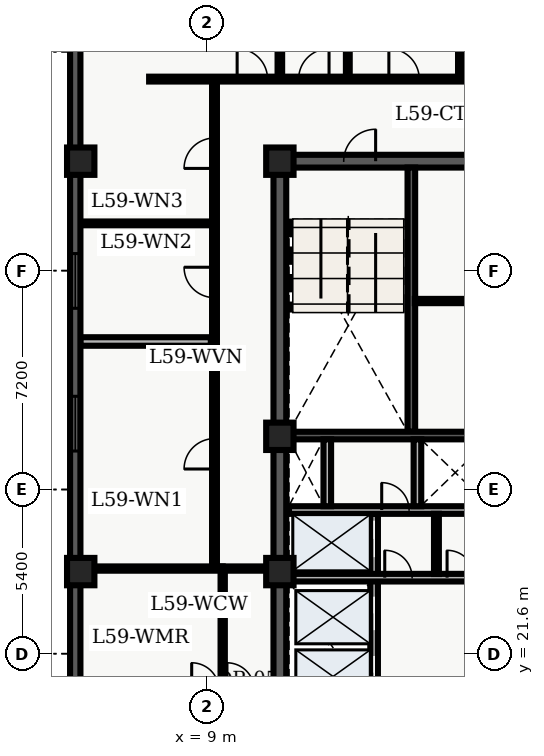
"""IFC4 building model, lengths in metres.
Left out: names, types, materials, properties, quantities, classifications, styles, units other than length and angle.
Written with IfcOpenShell. Run it as: python <this file> out.ifc"""

import sys

from ifc_helpers import new_model, entity, si_unit, converted_unit, direction, frame, origin_with_axes, origin_2d_with_axis, place, context, subcontext, project, spatial, polyline, rectangle, outline, extrude, element, fill, save


model = new_model("IFC4")
c1 = context("Model", 3, precision=1e-05, world=origin_with_axes(), true_north=direction((0.0, 1.0)))
c2 = subcontext(c1, "Body", "Model", "MODEL_VIEW")
j1 = project(units=[si_unit("LENGTHUNIT", "METRE"), converted_unit("PLANEANGLEUNIT", "DEGREE", entity("IfcPlaneAngleMeasure", 0.017), si_unit("PLANEANGLEUNIT", "RADIAN"), dimensions=[0, 0, 0, 0, 0, 0, 0])], contexts=[c1])
p1 = place(None, origin_with_axes())
s1 = spatial("IfcSite", under=j1, at=p1, CompositionType="ELEMENT")
p2 = place(p1, origin_with_axes())
s2 = spatial("IfcBuilding", under=s1, at=p2, CompositionType="ELEMENT")
p3 = place(p2, frame((0.0, 0.0, 240.3), z_axis=(0.0, 0.0, 1.0), x_axis=(1.0, 0.0, 0.0)))
s3 = spatial("IfcBuildingStorey", under=s2, at=p3, CompositionType="ELEMENT", Elevation=240.3)
p4 = place(p3, frame((11.4, 10.8, 0.0), z_axis=(0.0, 0.0, 1.0), x_axis=(0.0, 1.0, 0.0)))
e1 = element("IfcWall", 1, at=p4, inside=s3, PredefinedType="SHEAR", context=c2, shape_type="SweptSolid", body=[
    extrude(outline(polyline([(0.0, -0.21), (27.0, -0.21), (27.0, 0.21), (0.0, 0.21), (0.0, -0.21)])), origin_with_axes(), (0.0, 0.0, 1.0), 3.66),
])
p5 = place(p3, frame((11.4, 37.8, 0.0), z_axis=(0.0, 0.0, 1.0), x_axis=(1.0, 0.0, 0.0)))
e2 = element("IfcWall", 2, at=p5, inside=s3, PredefinedType="SHEAR", context=c2, shape_type="SweptSolid", body=[
    extrude(outline(polyline([(0.0, -0.21), (7.2, -0.21), (7.2, 0.21), (0.0, 0.21), (0.0, -0.21)])), origin_with_axes(), (0.0, 0.0, 1.0), 3.66),
])
p6 = place(p5, frame((2.625, 0.0, 0.0), z_axis=(0.0, 0.0, 1.0), x_axis=(1.0, 0.0, 0.0)))
e3 = element("IfcOpeningElement", 3, at=p6, cuts=e2, PredefinedType="OPENING", context=c2, shape_type="SweptSolid", body=[
    extrude(rectangle(XDim=1.05, YDim=0.44, at=origin_2d_with_axis()), origin_with_axes(), (0.0, 0.0, 1.0), 2.15),
])
p7 = place(p3, frame((15.725, 28.9, 0.0), z_axis=(0.0, 0.0, 1.0), x_axis=(0.0, 1.0, 0.0)))
e4 = element("IfcWall", 4, at=p7, inside=s3, PredefinedType="SHEAR", context=c2, shape_type="SweptSolid", body=[
    extrude(outline(polyline([(0.0, -0.125), (8.69, -0.125), (8.69, 0.125), (0.0, 0.125), (0.0, -0.125)])), origin_with_axes(), (0.0, 0.0, 1.0), 3.66),
])
p8 = place(p3, frame((11.61, 28.775, 0.0), z_axis=(0.0, 0.0, 1.0), x_axis=(1.0, 0.0, 0.0)))
e5 = element("IfcWall", 5, at=p8, inside=s3, PredefinedType="SHEAR", context=c2, shape_type="SweptSolid", body=[
    extrude(outline(polyline([(0.0, -0.125), (6.78, -0.125), (6.78, 0.125), (0.0, 0.125), (0.0, -0.125)])), origin_with_axes(), (0.0, 0.0, 1.0), 3.66),
])
p9 = place(p3, frame((14.5, 19.95, 0.0), z_axis=(0.0, 0.0, 1.0), x_axis=(0.0, 1.0, 0.0)))
e6 = element("IfcWall", 6, at=p9, inside=s3, PredefinedType="SOLIDWALL", context=c2, shape_type="SweptSolid", body=[
    extrude(outline(polyline([(0.0, -0.125), (6.25, -0.125), (6.25, 0.125), (0.0, 0.125), (0.0, -0.125)])), origin_with_axes(), (0.0, 0.0, 1.0), 2.7),
])
p10 = place(p9, frame((1.025, 0.0, 0.0), z_axis=(0.0, 0.0, 1.0), x_axis=(1.0, 0.0, 0.0)))
e7 = element("IfcOpeningElement", 7, at=p10, cuts=e6, PredefinedType="OPENING", context=c2, shape_type="SweptSolid", body=[
    extrude(rectangle(XDim=1.1, YDim=0.27, at=origin_2d_with_axis()), origin_with_axes(), (0.0, 0.0, 1.0), 2.15),
])
p11 = place(p9, frame((2.975, 0.0, 0.0), z_axis=(0.0, 0.0, 1.0), x_axis=(1.0, 0.0, 0.0)))
e8 = element("IfcOpeningElement", 8, at=p11, cuts=e6, PredefinedType="OPENING", context=c2, shape_type="SweptSolid", body=[
    extrude(rectangle(XDim=1.1, YDim=0.27, at=origin_2d_with_axis()), origin_with_axes(), (0.0, 0.0, 1.0), 2.15),
])
p12 = place(p9, frame((5.425, 0.0, 0.0), z_axis=(0.0, 0.0, 1.0), x_axis=(1.0, 0.0, 0.0)))
e9 = element("IfcOpeningElement", 9, at=p12, cuts=e6, PredefinedType="OPENING", context=c2, shape_type="SweptSolid", body=[
    extrude(rectangle(XDim=1.2, YDim=0.27, at=origin_2d_with_axis()), origin_with_axes(), (0.0, 0.0, 1.0), 2.15),
])
p13 = place(p3, frame((11.7, 24.1, 0.0), z_axis=(0.0, 0.0, 1.0), x_axis=(1.0, 0.0, 0.0)))
e10 = element("IfcWall", 10, at=p13, inside=s3, PredefinedType="SOLIDWALL", context=c2, shape_type="SweptSolid", body=[
    extrude(outline(polyline([(0.0, -0.125), (6.6, -0.125), (6.6, 0.125), (0.0, 0.125), (0.0, -0.125)])), origin_with_axes(), (0.0, 0.0, 1.0), 2.7),
])
p14 = place(p13, frame((3.6, 0.0, 0.0), z_axis=(0.0, 0.0, 1.0), x_axis=(1.0, 0.0, 0.0)))
e11 = element("IfcOpeningElement", 11, at=p14, cuts=e10, PredefinedType="OPENING", context=c2, shape_type="SweptSolid", body=[
    extrude(rectangle(XDim=0.9, YDim=0.27, at=origin_2d_with_axis()), origin_with_axes(), (0.0, 0.0, 1.0), 2.15),
])
p15 = place(p13, frame((5.65, 0.0, 0.0), z_axis=(0.0, 0.0, 1.0), x_axis=(1.0, 0.0, 0.0)))
e12 = element("IfcOpeningElement", 12, at=p15, cuts=e10, PredefinedType="OPENING", context=c2, shape_type="SweptSolid", body=[
    extrude(rectangle(XDim=0.9, YDim=0.27, at=origin_2d_with_axis()), origin_with_axes(), (0.0, 0.0, 1.0), 2.15),
])
p16 = place(p3, frame((11.7, 26.325, 0.0), z_axis=(0.0, 0.0, 1.0), x_axis=(1.0, 0.0, 0.0)))
e13 = element("IfcWall", 13, at=p16, inside=s3, PredefinedType="SOLIDWALL", context=c2, shape_type="SweptSolid", body=[
    extrude(outline(polyline([(0.0, -0.125), (6.6, -0.125), (6.6, 0.125), (0.0, 0.125), (0.0, -0.125)])), origin_with_axes(), (0.0, 0.0, 1.0), 2.7),
])
p17 = place(p16, frame((3.5, 0.0, 0.0), z_axis=(0.0, 0.0, 1.0), x_axis=(1.0, 0.0, 0.0)))
e14 = element("IfcOpeningElement", 14, at=p17, cuts=e13, PredefinedType="OPENING", context=c2, shape_type="SweptSolid", body=[
    extrude(rectangle(XDim=0.9, YDim=0.27, at=origin_2d_with_axis()), origin_with_axes(), (0.0, 0.0, 1.0), 2.15),
])
for number, where, z_axis, x_axis in (
    (15, (12.96, 26.45, 0.0), (0.0, 0.0, 1.0), (0.0, 1.0, 0.0)),
    (16, (15.925, 26.45, 0.0), (0.0, 0.0, 1.0), (0.0, 1.0, 0.0)),
):
    element("IfcWall", number, at=place(p3, frame(where, z_axis=z_axis, x_axis=x_axis)), inside=s3, PredefinedType="SOLIDWALL", context=c2, shape_type="SweptSolid", body=[
        extrude(outline(polyline([(0.0, -0.125), (2.2, -0.125), (2.2, 0.125), (0.0, 0.125), (0.0, -0.125)])), origin_with_axes(), (0.0, 0.0, 1.0), 2.7),
    ])
for number, where, z_axis, x_axis in (
    (17, (11.4, 24.3, 0.0), (0.0, 0.0, 1.0), (1.0, 0.0, 0.0)),
    (18, (11.4, 28.75, 0.0), (0.0, 0.0, 1.0), (1.0, 0.0, 0.0)),
    (19, (11.4, 37.8, 0.0), (0.0, 0.0, 1.0), (1.0, 0.0, 0.0)),
    (20, (4.85, 24.3, 0.0), (0.0, 0.0, 1.0), (1.0, 0.0, 0.0)),
    (21, (4.85, 37.8, 0.0), (0.0, 0.0, 1.0), (1.0, 0.0, 0.0)),
):
    element("IfcColumn", number, at=place(p3, frame(where, z_axis=z_axis, x_axis=x_axis)), inside=s3, PredefinedType="COLUMN", context=c2, shape_type="SweptSolid", body=[
        extrude(rectangle(XDim=0.9, YDim=0.9, at=origin_2d_with_axis()), origin_with_axes(), (0.0, 0.0, 1.0), 3.9),
    ])
p18 = place(p3, frame((16.55, 24.22, 0.0), z_axis=(0.0, 0.0, 1.0), x_axis=(0.0, 1.0, 0.0)))
e22 = element("IfcWall", 22, at=p18, inside=s3, PredefinedType="PARTITIONING", context=c2, shape_type="SweptSolid", body=[
    extrude(outline(polyline([(0.0, -0.08), (1.98, -0.08), (1.98, 0.08), (0.0, 0.08), (0.0, -0.08)])), origin_with_axes(), (0.0, 0.0, 1.0), 2.7),
])
p19 = place(p3, frame((15.84, 33.2, 0.0), z_axis=(0.0, 0.0, 1.0), x_axis=(1.0, 0.0, 0.0)))
e23 = element("IfcWall", 23, at=p19, inside=s3, PredefinedType="PARTITIONING", context=c2, shape_type="SweptSolid", body=[
    extrude(outline(polyline([(0.0, -0.07), (2.46, -0.07), (2.46, 0.07), (0.0, 0.07), (0.0, -0.07)])), origin_with_axes(), (0.0, 0.0, 1.0), 2.7),
])
p20 = place(p3, frame((9.52, 20.4, 0.0), z_axis=(0.0, 0.0, 1.0), x_axis=(0.0, 1.0, 0.0)))
e24 = element("IfcWall", 24, at=p20, inside=s3, PredefinedType="PARTITIONING", context=c2, shape_type="SweptSolid", body=[
    extrude(outline(polyline([(0.0, -0.07), (4.0, -0.07), (4.0, 0.07), (0.0, 0.07), (0.0, -0.07)])), origin_with_axes(), (0.0, 0.0, 1.0), 2.7),
])
p21 = place(p3, frame((9.52, 24.4, 0.0), z_axis=(0.0, 0.0, 1.0), x_axis=(1.0, 0.0, 0.0)))
e25 = element("IfcWall", 25, at=p21, inside=s3, PredefinedType="PARTITIONING", context=c2, shape_type="SweptSolid", body=[
    extrude(outline(polyline([(0.0, -0.07), (1.58, -0.07), (1.58, 0.07), (0.0, 0.07), (0.0, -0.07)])), origin_with_axes(), (0.0, 0.0, 1.0), 2.7),
])
p22 = place(p3, frame((7.1, 40.5, 0.0), z_axis=(0.0, 0.0, 1.0), x_axis=(1.0, 0.0, 0.0)))
e26 = element("IfcWall", 26, at=p22, inside=s3, PredefinedType="PARTITIONING", context=c2, shape_type="SweptSolid", body=[
    extrude(outline(polyline([(0.0, -0.08), (24.965, -0.08), (24.965, 0.08), (0.0, 0.08), (0.0, -0.08)])), origin_with_axes(), (0.0, 0.0, 1.0), 2.7),
])
p23 = place(p22, frame((3.395, 0.0, 0.0), z_axis=(0.0, 0.0, 1.0), x_axis=(1.0, 0.0, 0.0)))
e27 = element("IfcOpeningElement", 27, at=p23, cuts=e26, PredefinedType="OPENING", context=c2, shape_type="SweptSolid", body=[
    extrude(rectangle(XDim=1.0, YDim=0.18, at=origin_2d_with_axis()), origin_with_axes(), (0.0, 0.0, 1.0), 2.15),
])
p24 = place(p22, frame((5.418, 0.0, 0.0), z_axis=(0.0, 0.0, 1.0), x_axis=(1.0, 0.0, 0.0)))
e28 = element("IfcOpeningElement", 28, at=p24, cuts=e26, PredefinedType="OPENING", context=c2, shape_type="SweptSolid", body=[
    extrude(rectangle(XDim=1.0, YDim=0.18, at=origin_2d_with_axis()), origin_with_axes(), (0.0, 0.0, 1.0), 2.15),
])
p25 = place(p22, frame((8.386, 0.0, 0.0), z_axis=(0.0, 0.0, 1.0), x_axis=(1.0, 0.0, 0.0)))
e29 = element("IfcOpeningElement", 29, at=p25, cuts=e26, PredefinedType="OPENING", context=c2, shape_type="SweptSolid", body=[
    extrude(rectangle(XDim=1.0, YDim=0.18, at=origin_2d_with_axis()), origin_with_axes(), (0.0, 0.0, 1.0), 2.15),
])
p26 = place(p22, frame((11.068, 0.0, 0.0), z_axis=(0.0, 0.0, 1.0), x_axis=(1.0, 0.0, 0.0)))
e30 = element("IfcOpeningElement", 30, at=p26, cuts=e26, PredefinedType="OPENING", context=c2, shape_type="SweptSolid", body=[
    extrude(rectangle(XDim=1.0, YDim=0.18, at=origin_2d_with_axis()), origin_with_axes(), (0.0, 0.0, 1.0), 2.15),
])
p27 = place(p3, frame((9.25, 24.4, 0.0), z_axis=(0.0, 0.0, 1.0), x_axis=(0.0, 1.0, 0.0)))
e31 = element("IfcWall", 31, at=p27, inside=s3, PredefinedType="PARTITIONING", context=c2, shape_type="SweptSolid", body=[
    extrude(outline(polyline([(0.0, -0.08), (16.1, -0.08), (16.1, 0.08), (0.0, 0.08), (0.0, -0.08)])), origin_with_axes(), (0.0, 0.0, 1.0), 2.7),
])
p28 = place(p27, frame((3.775, 0.0, 0.0), z_axis=(0.0, 0.0, 1.0), x_axis=(1.0, 0.0, 0.0)))
e32 = element("IfcOpeningElement", 32, at=p28, cuts=e31, PredefinedType="OPENING", context=c2, shape_type="SweptSolid", body=[
    extrude(rectangle(XDim=1.0, YDim=0.18, at=origin_2d_with_axis()), origin_with_axes(), (0.0, 0.0, 1.0), 2.15),
])
p29 = place(p27, frame((9.412, 0.0, 0.0), z_axis=(0.0, 0.0, 1.0), x_axis=(1.0, 0.0, 0.0)))
e33 = element("IfcOpeningElement", 33, at=p29, cuts=e31, PredefinedType="OPENING", context=c2, shape_type="SweptSolid", body=[
    extrude(rectangle(XDim=1.0, YDim=0.18, at=origin_2d_with_axis()), origin_with_axes(), (0.0, 0.0, 1.0), 2.15),
])
p30 = place(p27, frame((13.662, 0.0, 0.0), z_axis=(0.0, 0.0, 1.0), x_axis=(1.0, 0.0, 0.0)))
e34 = element("IfcOpeningElement", 34, at=p30, cuts=e31, PredefinedType="OPENING", context=c2, shape_type="SweptSolid", body=[
    extrude(rectangle(XDim=1.0, YDim=0.18, at=origin_2d_with_axis()), origin_with_axes(), (0.0, 0.0, 1.0), 2.15),
])
p31 = place(p3, frame((4.835, 24.4, 0.0), z_axis=(0.0, 0.0, 1.0), x_axis=(1.0, 0.0, 0.0)))
e35 = element("IfcWall", 35, at=p31, inside=s3, PredefinedType="PARTITIONING", context=c2, shape_type="SweptSolid", body=[
    extrude(outline(polyline([(0.0, -0.07), (4.685, -0.07), (4.685, 0.07), (0.0, 0.07), (0.0, -0.07)])), origin_with_axes(), (0.0, 0.0, 1.0), 2.7),
])
p32 = place(p3, frame((4.835, 31.869, 0.0), z_axis=(0.0, 0.0, 1.0), x_axis=(1.0, 0.0, 0.0)))
e36 = element("IfcWall", 36, at=p32, inside=s3, PredefinedType="PARTITIONING", context=c2, shape_type="SweptSolid", body=[
    extrude(outline(polyline([(0.0, -0.14), (4.295, -0.14), (4.295, 0.14), (0.0, 0.14), (0.0, -0.14)])), origin_with_axes(), (0.0, 0.0, 1.0), 2.7),
])
p33 = place(p3, frame((4.835, 35.754, 0.0), z_axis=(0.0, 0.0, 1.0), x_axis=(1.0, 0.0, 0.0)))
e37 = element("IfcWall", 37, at=p33, inside=s3, PredefinedType="PARTITIONING", context=c2, shape_type="SweptSolid", body=[
    extrude(outline(polyline([(0.0, -0.062), (4.295, -0.062), (4.295, 0.062), (0.0, 0.062), (0.0, -0.062)])), origin_with_axes(), (0.0, 0.0, 1.0), 2.7),
])
p34 = place(p3, frame((11.4, 40.6, 0.0), z_axis=(0.0, 0.0, 1.0), x_axis=(0.0, 1.0, 0.0)))
e38 = element("IfcWall", 38, at=p34, inside=s3, PredefinedType="PARTITIONING", context=c2, shape_type="SweptSolid", body=[
    extrude(outline(polyline([(0.0, -0.075), (7.665, -0.075), (7.665, 0.075), (0.0, 0.075), (0.0, -0.075)])), origin_with_axes(), (0.0, 0.0, 1.0), 2.7),
])
p35 = place(p3, frame((13.635, 40.6, 0.0), z_axis=(0.0, 0.0, 1.0), x_axis=(0.0, 1.0, 0.0)))
e39 = element("IfcWall", 39, at=p35, inside=s3, PredefinedType="PARTITIONING", context=c2, shape_type="SweptSolid", body=[
    extrude(outline(polyline([(0.0, -0.062), (7.665, -0.062), (7.665, 0.062), (0.0, 0.062), (0.0, -0.062)])), origin_with_axes(), (0.0, 0.0, 1.0), 2.7),
])
p36 = place(p3, frame((17.336, 40.6, 0.0), z_axis=(0.0, 0.0, 1.0), x_axis=(0.0, 1.0, 0.0)))
e40 = element("IfcWall", 40, at=p36, inside=s3, PredefinedType="PARTITIONING", context=c2, shape_type="SweptSolid", body=[
    extrude(outline(polyline([(0.0, -0.075), (7.665, -0.075), (7.665, 0.075), (0.0, 0.075), (0.0, -0.075)])), origin_with_axes(), (0.0, 0.0, 1.0), 2.7),
])
p37 = place(p3, frame((4.67, 2.74, 0.0), z_axis=(0.0, 0.0, 1.0), x_axis=(0.0, 1.0, 0.0)))
e41 = element("IfcWall", 41, at=p37, inside=s3, PredefinedType="SOLIDWALL", context=c2, shape_type="SweptSolid", body=[
    extrude(outline(polyline([(0.0, -0.17), (43.46, -0.17), (43.46, 0.17), (0.0, 0.17), (0.0, -0.17)])), origin_with_axes(), (0.0, 0.0, 1.0), 3.66),
])
p38 = place(p37, frame((2.948, 0.0, 0.45), z_axis=(0.0, 0.0, 1.0), x_axis=(1.0, 0.0, 0.0)))
e42 = element("IfcOpeningElement", 42, at=p38, cuts=e41, PredefinedType="OPENING", context=c2, shape_type="SweptSolid", body=[
    extrude(rectangle(XDim=1.8, YDim=0.36, at=origin_2d_with_axis()), origin_with_axes(), (0.0, 0.0, 1.0), 2.1),
])
p39 = place(p37, frame((12.339, 0.0, 0.45), z_axis=(0.0, 0.0, 1.0), x_axis=(1.0, 0.0, 0.0)))
e43 = element("IfcOpeningElement", 43, at=p39, cuts=e41, PredefinedType="OPENING", context=c2, shape_type="SweptSolid", body=[
    extrude(rectangle(XDim=1.8, YDim=0.36, at=origin_2d_with_axis()), origin_with_axes(), (0.0, 0.0, 1.0), 2.1),
])
p40 = place(p37, frame((16.184, 0.0, 0.45), z_axis=(0.0, 0.0, 1.0), x_axis=(1.0, 0.0, 0.0)))
e44 = element("IfcOpeningElement", 44, at=p40, cuts=e41, PredefinedType="OPENING", context=c2, shape_type="SweptSolid", body=[
    extrude(rectangle(XDim=1.8, YDim=0.36, at=origin_2d_with_axis()), origin_with_axes(), (0.0, 0.0, 1.0), 2.1),
])
p41 = place(p37, frame((26.426, 0.0, 0.45), z_axis=(0.0, 0.0, 1.0), x_axis=(1.0, 0.0, 0.0)))
e45 = element("IfcOpeningElement", 45, at=p41, cuts=e41, PredefinedType="OPENING", context=c2, shape_type="SweptSolid", body=[
    extrude(rectangle(XDim=1.8, YDim=0.36, at=origin_2d_with_axis()), origin_with_axes(), (0.0, 0.0, 1.0), 2.1),
])
p42 = place(p37, frame((31.121, 0.0, 0.45), z_axis=(0.0, 0.0, 1.0), x_axis=(1.0, 0.0, 0.0)))
e46 = element("IfcOpeningElement", 46, at=p42, cuts=e41, PredefinedType="OPENING", context=c2, shape_type="SweptSolid", body=[
    extrude(rectangle(XDim=1.8, YDim=0.36, at=origin_2d_with_axis()), origin_with_axes(), (0.0, 0.0, 1.0), 2.1),
])
p43 = place(p37, frame((40.062, 0.0, 0.45), z_axis=(0.0, 0.0, 1.0), x_axis=(1.0, 0.0, 0.0)))
e47 = element("IfcOpeningElement", 47, at=p43, cuts=e41, PredefinedType="OPENING", context=c2, shape_type="SweptSolid", body=[
    extrude(rectangle(XDim=1.8, YDim=0.36, at=origin_2d_with_axis()), origin_with_axes(), (0.0, 0.0, 1.0), 2.1),
])
p44 = place(p9, frame((1.025, 0.0, 0.0), z_axis=(0.0, 0.0, 1.0), x_axis=(1.0, 0.0, 0.0)))
e48 = element("IfcDoor", 48, at=p44, inside=s3, OperationType="SLIDING_TO_LEFT", PredefinedType="DOOR", context=c2, shape_type="SweptSolid", body=[
    extrude(rectangle(XDim=1.1, YDim=0.09, at=origin_2d_with_axis()), origin_with_axes(), (0.0, 0.0, 1.0), 2.15),
])
fill(e7, e48)
p45 = place(p9, frame((2.975, 0.0, 0.0), z_axis=(0.0, 0.0, 1.0), x_axis=(1.0, 0.0, 0.0)))
e49 = element("IfcDoor", 49, at=p45, inside=s3, OperationType="SLIDING_TO_RIGHT", PredefinedType="DOOR", context=c2, shape_type="SweptSolid", body=[
    extrude(rectangle(XDim=1.1, YDim=0.09, at=origin_2d_with_axis()), origin_with_axes(), (0.0, 0.0, 1.0), 2.15),
])
fill(e8, e49)
p46 = place(p9, frame((5.425, 0.0, 0.0), z_axis=(0.0, 0.0, 1.0), x_axis=(1.0, 0.0, 0.0)))
e50 = element("IfcDoor", 50, at=p46, inside=s3, OperationType="DOUBLE_DOOR_SLIDING", PredefinedType="DOOR", context=c2, shape_type="SweptSolid", body=[
    extrude(rectangle(XDim=1.2, YDim=0.09, at=origin_2d_with_axis()), origin_with_axes(), (0.0, 0.0, 1.0), 2.15),
])
fill(e9, e50)
p47 = place(p5, frame((2.625, 0.0, 0.0), z_axis=(0.0, 0.0, 1.0), x_axis=(1.0, 0.0, 0.0)))
e51 = element("IfcDoor", 51, at=p47, inside=s3, OperationType="SINGLE_SWING_RIGHT", PredefinedType="DOOR", context=c2, shape_type="SweptSolid", body=[
    extrude(rectangle(XDim=1.05, YDim=0.09, at=origin_2d_with_axis()), origin_with_axes(), (0.0, 0.0, 1.0), 2.15),
])
fill(e3, e51)
p48 = place(p13, frame((3.6, 0.0, 0.0), z_axis=(0.0, 0.0, 1.0), x_axis=(1.0, 0.0, 0.0)))
e52 = element("IfcDoor", 52, at=p48, inside=s3, OperationType="SINGLE_SWING_LEFT", PredefinedType="DOOR", context=c2, shape_type="SweptSolid", body=[
    extrude(rectangle(XDim=0.9, YDim=0.09, at=origin_2d_with_axis()), origin_with_axes(), (0.0, 0.0, 1.0), 2.15),
])
fill(e11, e52)
p49 = place(p13, frame((5.65, 0.0, 0.0), z_axis=(0.0, 0.0, 1.0), x_axis=(1.0, 0.0, 0.0)))
e53 = element("IfcDoor", 53, at=p49, inside=s3, OperationType="SINGLE_SWING_LEFT", PredefinedType="DOOR", context=c2, shape_type="SweptSolid", body=[
    extrude(rectangle(XDim=0.9, YDim=0.09, at=origin_2d_with_axis()), origin_with_axes(), (0.0, 0.0, 1.0), 2.15),
])
fill(e12, e53)
p50 = place(p16, frame((3.5, 0.0, 0.0), z_axis=(0.0, 0.0, 1.0), x_axis=(1.0, 0.0, 0.0)))
e54 = element("IfcDoor", 54, at=p50, inside=s3, OperationType="SINGLE_SWING_LEFT", PredefinedType="DOOR", context=c2, shape_type="SweptSolid", body=[
    extrude(rectangle(XDim=0.9, YDim=0.09, at=origin_2d_with_axis()), origin_with_axes(), (0.0, 0.0, 1.0), 2.15),
])
fill(e14, e54)
p51 = place(p27, frame((3.775, 0.0, 0.0), z_axis=(0.0, 0.0, 1.0), x_axis=(1.0, 0.0, 0.0)))
e55 = element("IfcDoor", 55, at=p51, inside=s3, OperationType="SINGLE_SWING_LEFT", PredefinedType="DOOR", context=c2, shape_type="SweptSolid", body=[
    extrude(rectangle(XDim=1.0, YDim=0.09, at=origin_2d_with_axis()), origin_with_axes(), (0.0, 0.0, 1.0), 2.15),
])
fill(e32, e55)
p52 = place(p27, frame((9.412, 0.0, 0.0), z_axis=(0.0, 0.0, 1.0), x_axis=(1.0, 0.0, 0.0)))
e56 = element("IfcDoor", 56, at=p52, inside=s3, OperationType="SINGLE_SWING_RIGHT", PredefinedType="DOOR", context=c2, shape_type="SweptSolid", body=[
    extrude(rectangle(XDim=1.0, YDim=0.09, at=origin_2d_with_axis()), origin_with_axes(), (0.0, 0.0, 1.0), 2.15),
])
fill(e33, e56)
p53 = place(p27, frame((13.662, 0.0, 0.0), z_axis=(0.0, 0.0, 1.0), x_axis=(1.0, 0.0, 0.0)))
e57 = element("IfcDoor", 57, at=p53, inside=s3, OperationType="SINGLE_SWING_LEFT", PredefinedType="DOOR", context=c2, shape_type="SweptSolid", body=[
    extrude(rectangle(XDim=1.0, YDim=0.09, at=origin_2d_with_axis()), origin_with_axes(), (0.0, 0.0, 1.0), 2.15),
])
fill(e34, e57)
p54 = place(p22, frame((3.395, 0.0, 0.0), z_axis=(0.0, 0.0, 1.0), x_axis=(1.0, 0.0, 0.0)))
e58 = element("IfcDoor", 58, at=p54, inside=s3, OperationType="SINGLE_SWING_LEFT", PredefinedType="DOOR", context=c2, shape_type="SweptSolid", body=[
    extrude(rectangle(XDim=1.0, YDim=0.09, at=origin_2d_with_axis()), origin_with_axes(), (0.0, 0.0, 1.0), 2.15),
])
fill(e27, e58)
p55 = place(p22, frame((5.418, 0.0, 0.0), z_axis=(0.0, 0.0, 1.0), x_axis=(1.0, 0.0, 0.0)))
e59 = element("IfcDoor", 59, at=p55, inside=s3, OperationType="SINGLE_SWING_RIGHT", PredefinedType="DOOR", context=c2, shape_type="SweptSolid", body=[
    extrude(rectangle(XDim=1.0, YDim=0.09, at=origin_2d_with_axis()), origin_with_axes(), (0.0, 0.0, 1.0), 2.15),
])
fill(e28, e59)
p56 = place(p22, frame((8.386, 0.0, 0.0), z_axis=(0.0, 0.0, 1.0), x_axis=(1.0, 0.0, 0.0)))
e60 = element("IfcDoor", 60, at=p56, inside=s3, OperationType="SINGLE_SWING_LEFT", PredefinedType="DOOR", context=c2, shape_type="SweptSolid", body=[
    extrude(rectangle(XDim=1.0, YDim=0.09, at=origin_2d_with_axis()), origin_with_axes(), (0.0, 0.0, 1.0), 2.15),
])
fill(e29, e60)
p57 = place(p37, frame((26.426, 0.0, 0.45), z_axis=(0.0, 0.0, 1.0), x_axis=(1.0, 0.0, 0.0)))
e61 = element("IfcWindow", 61, at=p57, inside=s3, PredefinedType="WINDOW", context=c2, shape_type="SweptSolid", body=[
    extrude(rectangle(XDim=1.8, YDim=0.09, at=origin_2d_with_axis()), origin_with_axes(), (0.0, 0.0, 1.0), 2.1),
])
fill(e45, e61)
p58 = place(p37, frame((31.121, 0.0, 0.45), z_axis=(0.0, 0.0, 1.0), x_axis=(1.0, 0.0, 0.0)))
e62 = element("IfcWindow", 62, at=p58, inside=s3, PredefinedType="WINDOW", context=c2, shape_type="SweptSolid", body=[
    extrude(rectangle(XDim=1.8, YDim=0.09, at=origin_2d_with_axis()), origin_with_axes(), (0.0, 0.0, 1.0), 2.1),
])
fill(e46, e62)
save(model, sys.argv[1])
